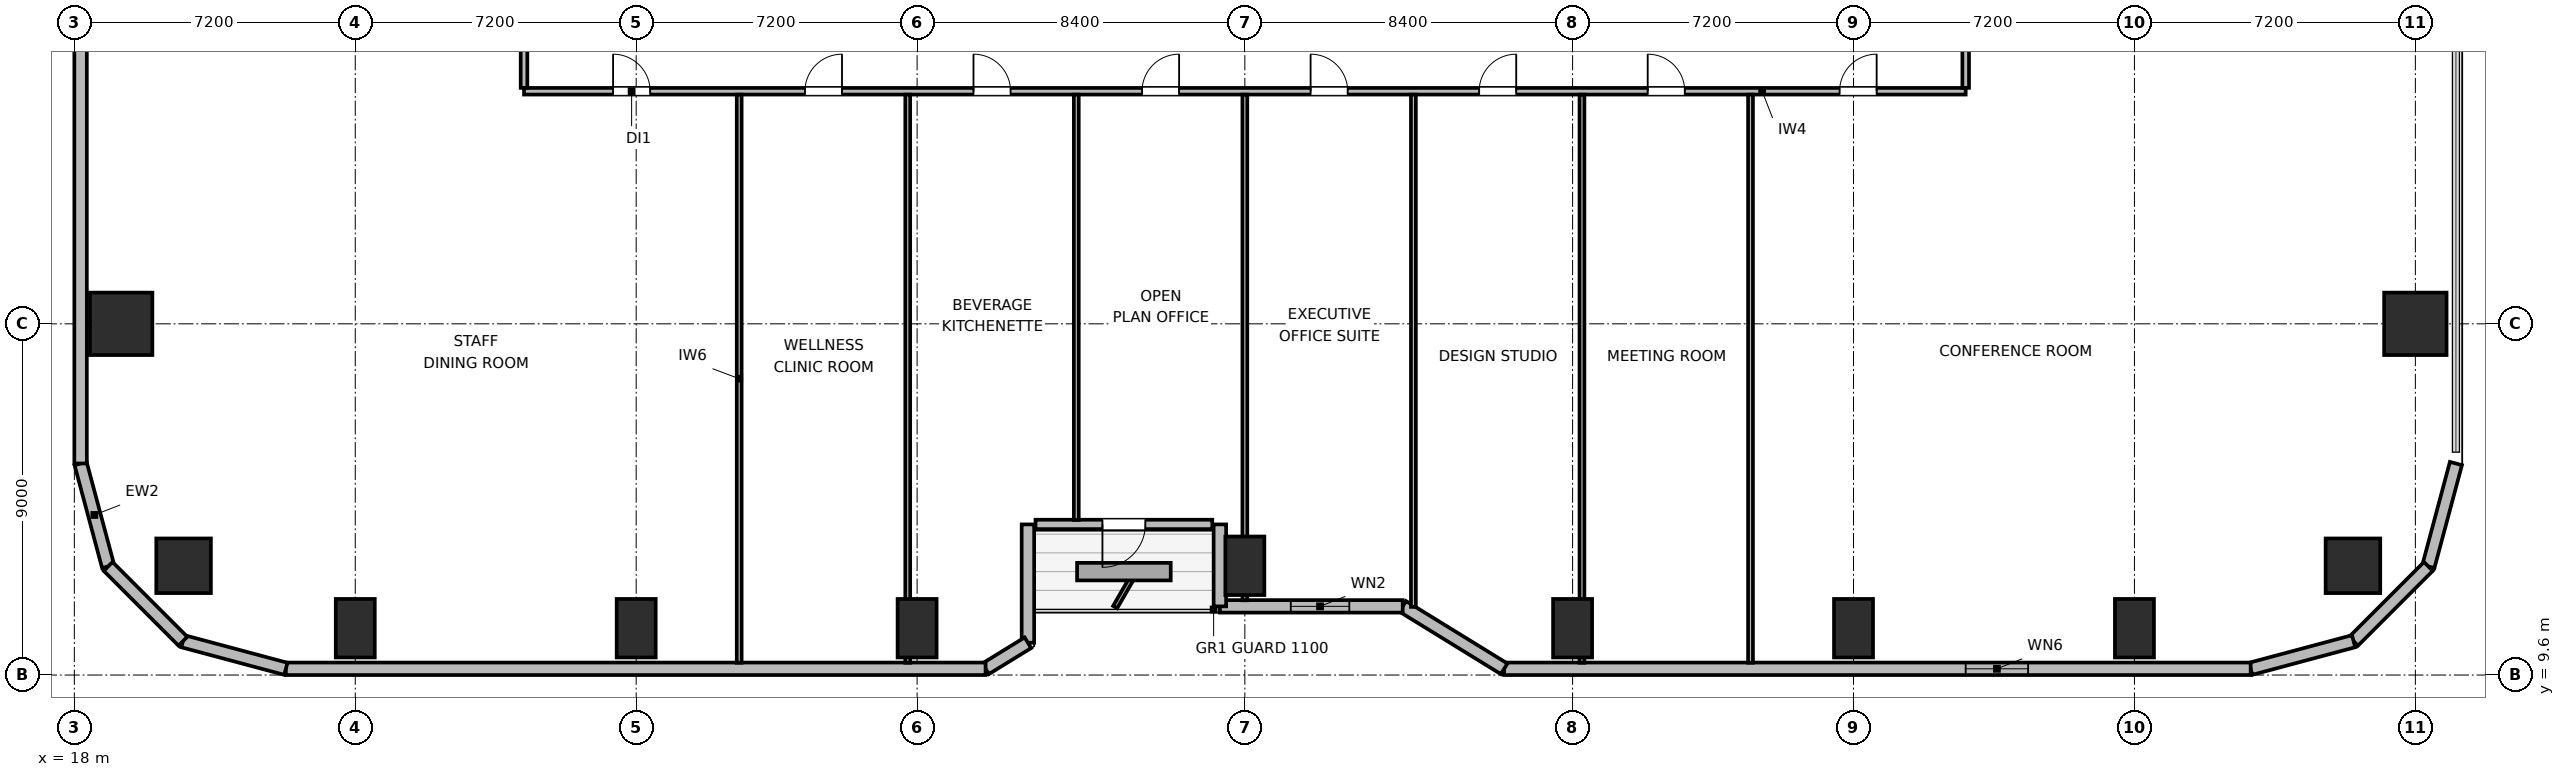
"""IFC4 building model, lengths in metres.
Left out: names, types, materials, properties, quantities, classifications, styles, units other than length and angle.
Written with IfcOpenShell. Run it as: python <this file> out.ifc"""

import sys

from ifc_helpers import new_model, si_unit, direction, frame, frame_2d, origin, origin_2d, place, context, subcontext, project, spatial, rectangle, circle, extrude, element, fill, save


model = new_model("IFC4")
c1 = context("Model", 3, precision=1e-05, world=origin(), true_north=direction((0.0, 1.0)))
c2 = subcontext(c1, "Body", "Model", "MODEL_VIEW")
j1 = project(units=[si_unit("LENGTHUNIT", "METRE"), si_unit("PLANEANGLEUNIT", "RADIAN")], contexts=[c1])
p1 = place(None, origin())
s1 = spatial("IfcSite", under=j1, at=p1, CompositionType="ELEMENT")
p2 = place(p1, origin())
s2 = spatial("IfcBuilding", under=s1, at=p2, CompositionType="ELEMENT")
p3 = place(p2, frame((0.0, 0.0, 56.7)))
s3 = spatial("IfcBuildingStorey", under=s2, at=p3, CompositionType="ELEMENT", Elevation=56.7)
for number, where, z_axis, x_axis in (
    (1, (20.8, 12.4, 0.0), (0.0, 0.0, 1.0), (1.0, 0.0, 0.0)),
    (2, (76.4, 12.4, 0.0), (0.0, 0.0, 1.0), (1.0, 0.0, 0.0)),
):
    element("IfcColumn", number, at=place(p3, frame(where, z_axis=z_axis, x_axis=x_axis)), inside=s3, PredefinedType="COLUMN", context=c2, shape_type="SweptSolid", body=[
        extrude(circle(Radius=0.7, at=origin_2d()), origin(), (0.0, 0.0, 1.0), 3.9),
    ])
for number, where, z_axis, x_axis in (
    (3, (25.2, 10.8, 0.0), (0.0, 0.0, 1.0), (1.0, 0.0, 0.0)),
    (4, (32.4, 10.8, 0.0), (0.0, 0.0, 1.0), (1.0, 0.0, 0.0)),
    (5, (39.6, 10.8, 0.0), (0.0, 0.0, 1.0), (1.0, 0.0, 0.0)),
    (6, (48.0, 12.4, 0.0), (0.0, 0.0, 1.0), (1.0, 0.0, 0.0)),
    (7, (56.4, 10.8, 0.0), (0.0, 0.0, 1.0), (1.0, 0.0, 0.0)),
    (8, (63.6, 10.8, 0.0), (0.0, 0.0, 1.0), (1.0, 0.0, 0.0)),
    (9, (70.8, 10.8, 0.0), (0.0, 0.0, 1.0), (1.0, 0.0, 0.0)),
):
    element("IfcColumn", number, at=place(p3, frame(where, z_axis=z_axis, x_axis=x_axis)), inside=s3, PredefinedType="COLUMN", context=c2, shape_type="SweptSolid", body=[
        extrude(rectangle(XDim=1.0, YDim=1.5, at=origin_2d()), origin(), (0.0, 0.0, 1.0), 3.9),
    ])
for number, where, z_axis, x_axis in (
    (10, (19.2, 18.6, 0.0), (0.0, 0.0, 1.0), (1.0, 0.0, 0.0)),
    (11, (78.0, 18.6, 0.0), (0.0, 0.0, 1.0), (1.0, 0.0, 0.0)),
):
    element("IfcColumn", number, at=place(p3, frame(where, z_axis=z_axis, x_axis=x_axis)), inside=s3, PredefinedType="COLUMN", context=c2, shape_type="SweptSolid", body=[
        extrude(rectangle(XDim=1.6, YDim=1.6, at=origin_2d()), origin(), (0.0, 0.0, 1.0), 3.9),
    ])
p4 = place(p3, frame((18.866, 12.383, 0.0), z_axis=(0.0, 0.0, 1.0), x_axis=(-0.25869736047, 0.965958423373, 0.0)))
e12 = element("IfcWall", 12, at=p4, inside=s3, PredefinedType="SOLIDWALL", context=c2, shape_type="SweptSolid", body=[
    extrude(rectangle(XDim=2.731, YDim=0.32, at=frame_2d((1.366, 0.0))), origin(), (0.0, 0.0, 1.0), 3.64),
])
p5 = place(p3, frame((18.16, 15.021, 0.0), z_axis=(0.0, 0.0, 1.0), x_axis=(0.0, 1.0, 0.0)))
e13 = element("IfcWall", 13, at=p5, inside=s3, PredefinedType="SOLIDWALL", context=c2, shape_type="SweptSolid", body=[
    extrude(rectangle(XDim=14.219, YDim=0.32, at=frame_2d((7.109, 0.0))), origin(), (0.0, 0.0, 1.0), 3.64),
])
p6 = place(p3, frame((79.04, 15.021, 0.0), z_axis=(0.0, 0.0, 1.0), x_axis=(-0.25869736047, -0.965958423373, 0.0)))
e14 = element("IfcWall", 14, at=p6, inside=s3, PredefinedType="SOLIDWALL", context=c2, shape_type="SweptSolid", body=[
    extrude(rectangle(XDim=2.731, YDim=0.32, at=frame_2d((1.366, 0.0))), origin(), (0.0, 0.0, 1.0), 3.64),
])
p7 = place(p3, frame((78.333, 12.383, 0.0), z_axis=(0.0, 0.0, 1.0), x_axis=(-0.707106781187, -0.707106781187, 0.0)))
e15 = element("IfcWall", 15, at=p7, inside=s3, PredefinedType="SOLIDWALL", context=c2, shape_type="SweptSolid", body=[
    extrude(rectangle(XDim=2.71, YDim=0.32, at=frame_2d((1.355, 0.0))), origin(), (0.0, 0.0, 1.0), 3.64),
])
p8 = place(p3, frame((76.417, 10.467, 0.0), z_axis=(0.0, 0.0, 1.0), x_axis=(-0.965964405026, -0.25867502435, 0.0)))
e16 = element("IfcWall", 16, at=p8, inside=s3, PredefinedType="SOLIDWALL", context=c2, shape_type="SweptSolid", body=[
    extrude(rectangle(XDim=2.731, YDim=0.32, at=frame_2d((1.366, 0.0))), origin(), (0.0, 0.0, 1.0), 3.64),
])
p9 = place(p3, frame((73.779, 9.76, 0.0), z_axis=(0.0, 0.0, 1.0), x_axis=(-1.0, 0.0, 0.0)))
e17 = element("IfcWall", 17, at=p9, inside=s3, PredefinedType="SOLIDWALL", context=c2, shape_type="SweptSolid", body=[
    extrude(rectangle(XDim=19.134, YDim=0.32, at=frame_2d((9.567, 0.0))), origin(), (0.0, 0.0, 1.0), 3.64),
])
p10 = place(p9, frame((5.704, 0.0, 0.85)))
e18 = element("IfcOpeningElement", 18, at=p10, cuts=e17, PredefinedType="OPENING", context=c2, shape_type="SweptSolid", body=[
    extrude(rectangle(XDim=1.6, YDim=1.0, at=frame_2d((0.8, 0.5))), frame((0.0, 0.17, 0.0), z_axis=(0.0, -1.0, 0.0), x_axis=(1.0, 0.0, 0.0)), (0.0, 0.0, 1.0), 0.34),
])
p11 = place(p3, frame((54.645, 9.76, 0.0), z_axis=(0.0, 0.0, 1.0), x_axis=(-0.851630857047, 0.524142044989, 0.0)))
e19 = element("IfcWall", 19, at=p11, inside=s3, PredefinedType="SOLIDWALL", context=c2, shape_type="SweptSolid", body=[
    extrude(rectangle(XDim=3.053, YDim=0.32, at=frame_2d((1.526, 0.0))), origin(), (0.0, 0.0, 1.0), 2.875),
])
p12 = place(p3, frame((52.045, 11.36, 0.0), z_axis=(0.0, 0.0, 1.0), x_axis=(-1.0, 0.0, 0.0)))
e20 = element("IfcWall", 20, at=p12, inside=s3, PredefinedType="SOLIDWALL", context=c2, shape_type="SweptSolid", body=[
    extrude(rectangle(XDim=4.685, YDim=0.32, at=frame_2d((2.343, 0.0))), origin(), (0.0, 0.0, 1.0), 2.875),
])
p13 = place(p12, frame((1.368, 0.0, 0.85)))
e21 = element("IfcOpeningElement", 21, at=p13, cuts=e20, PredefinedType="OPENING", context=c2, shape_type="SweptSolid", body=[
    extrude(rectangle(XDim=1.5, YDim=1.1, at=frame_2d((0.75, 0.55))), frame((0.0, 0.17, 0.0), z_axis=(0.0, -1.0, 0.0), x_axis=(1.0, 0.0, 0.0)), (0.0, 0.0, 1.0), 0.34),
])
p14 = place(p3, frame((47.36, 11.36, 0.0), z_axis=(0.0, 0.0, 1.0), x_axis=(0.0, 1.0, 0.0)))
e22 = element("IfcWall", 22, at=p14, inside=s3, PredefinedType="SOLIDWALL", context=c2, shape_type="SweptSolid", body=[
    extrude(rectangle(XDim=2.1, YDim=0.32, at=frame_2d((1.05, 0.0))), origin(), (0.0, 0.0, 1.0), 2.875),
])
p15 = place(p3, frame((47.165, 13.46, 0.0), z_axis=(0.0, 0.0, 1.0), x_axis=(-1.0, 0.0, 0.0)))
e23 = element("IfcWall", 23, at=p15, inside=s3, PredefinedType="SOLIDWALL", context=c2, shape_type="SweptSolid", body=[
    extrude(rectangle(XDim=4.53, YDim=0.24, at=frame_2d((2.265, 0.0))), origin(), (0.0, 0.0, 1.0), 3.64),
])
p16 = place(p15, frame((1.715, 0.0, 0.0)))
e24 = element("IfcOpeningElement", 24, at=p16, cuts=e23, PredefinedType="OPENING", context=c2, shape_type="SweptSolid", body=[
    extrude(rectangle(XDim=1.1, YDim=2.04, at=frame_2d((0.55, 1.02))), frame((0.0, 0.13, 0.0), z_axis=(0.0, -1.0, 0.0), x_axis=(1.0, 0.0, 0.0)), (0.0, 0.0, 1.0), 0.26),
])
p17 = place(p3, frame((42.44, 13.46, 0.0), z_axis=(0.0, 0.0, 1.0), x_axis=(0.0, -1.0, 0.0)))
e25 = element("IfcWall", 25, at=p17, inside=s3, PredefinedType="SOLIDWALL", context=c2, shape_type="SweptSolid", body=[
    extrude(rectangle(XDim=3.032, YDim=0.32, at=frame_2d((1.516, 0.0))), origin(), (0.0, 0.0, 1.0), 2.875),
])
p18 = place(p3, frame((42.44, 10.427, 0.0), z_axis=(0.0, 0.0, 1.0), x_axis=(-0.851776724646, -0.523904964045, 0.0)))
e26 = element("IfcWall", 26, at=p18, inside=s3, PredefinedType="SOLIDWALL", context=c2, shape_type="SweptSolid", body=[
    extrude(rectangle(XDim=1.274, YDim=0.32, at=frame_2d((0.637, 0.0))), origin(), (0.0, 0.0, 1.0), 3.64),
])
p19 = place(p3, frame((41.355, 9.76, 0.0), z_axis=(0.0, 0.0, 1.0), x_axis=(-1.0, 0.0, 0.0)))
e27 = element("IfcWall", 27, at=p19, inside=s3, PredefinedType="SOLIDWALL", context=c2, shape_type="SweptSolid", body=[
    extrude(rectangle(XDim=17.934, YDim=0.32, at=frame_2d((8.967, 0.0))), origin(), (0.0, 0.0, 1.0), 3.64),
])
p20 = place(p3, frame((23.421, 9.76, 0.0), z_axis=(0.0, 0.0, 1.0), x_axis=(-0.965964405026, 0.25867502435, 0.0)))
e28 = element("IfcWall", 28, at=p20, inside=s3, PredefinedType="SOLIDWALL", context=c2, shape_type="SweptSolid", body=[
    extrude(rectangle(XDim=2.731, YDim=0.32, at=frame_2d((1.366, 0.0))), origin(), (0.0, 0.0, 1.0), 3.64),
])
p21 = place(p3, frame((20.783, 10.467, 0.0), z_axis=(0.0, 0.0, 1.0), x_axis=(-0.707106781187, 0.707106781187, 0.0)))
e29 = element("IfcWall", 29, at=p21, inside=s3, PredefinedType="SOLIDWALL", context=c2, shape_type="SweptSolid", body=[
    extrude(rectangle(XDim=2.71, YDim=0.32, at=frame_2d((1.355, 0.0))), origin(), (0.0, 0.0, 1.0), 3.64),
])
p22 = place(p3, frame((29.525, 24.56, 0.0), z_axis=(0.0, 0.0, 1.0), x_axis=(1.0, 0.0, 0.0)))
e30 = element("IfcWall", 30, at=p22, inside=s3, PredefinedType="PARTITIONING", context=c2, shape_type="SweptSolid", body=[
    extrude(rectangle(XDim=36.95, YDim=0.17, at=frame_2d((18.475, 0.0))), origin(), (0.0, 0.0, 1.0), 3.64),
])
p23 = place(p22, frame((2.283, 0.0, 0.0)))
e31 = element("IfcOpeningElement", 31, at=p23, cuts=e30, PredefinedType="OPENING", context=c2, shape_type="SweptSolid", body=[
    extrude(rectangle(XDim=0.95, YDim=2.04, at=frame_2d((0.475, 1.02))), frame((0.0, 0.095, 0.0), z_axis=(0.0, -1.0, 0.0), x_axis=(1.0, 0.0, 0.0)), (0.0, 0.0, 1.0), 0.19),
])
p24 = place(p22, frame((7.2, 0.0, 0.0)))
e32 = element("IfcOpeningElement", 32, at=p24, cuts=e30, PredefinedType="OPENING", context=c2, shape_type="SweptSolid", body=[
    extrude(rectangle(XDim=0.95, YDim=2.04, at=frame_2d((0.475, 1.02))), frame((0.0, 0.095, 0.0), z_axis=(0.0, -1.0, 0.0), x_axis=(1.0, 0.0, 0.0)), (0.0, 0.0, 1.0), 0.19),
])
p25 = place(p22, frame((11.52, 0.0, 0.0)))
e33 = element("IfcOpeningElement", 33, at=p25, cuts=e30, PredefinedType="OPENING", context=c2, shape_type="SweptSolid", body=[
    extrude(rectangle(XDim=0.95, YDim=2.04, at=frame_2d((0.475, 1.02))), frame((0.0, 0.095, 0.0), z_axis=(0.0, -1.0, 0.0), x_axis=(1.0, 0.0, 0.0)), (0.0, 0.0, 1.0), 0.19),
])
p26 = place(p22, frame((15.84, 0.0, 0.0)))
e34 = element("IfcOpeningElement", 34, at=p26, cuts=e30, PredefinedType="OPENING", context=c2, shape_type="SweptSolid", body=[
    extrude(rectangle(XDim=0.95, YDim=2.04, at=frame_2d((0.475, 1.02))), frame((0.0, 0.095, 0.0), z_axis=(0.0, -1.0, 0.0), x_axis=(1.0, 0.0, 0.0)), (0.0, 0.0, 1.0), 0.19),
])
p27 = place(p22, frame((20.16, 0.0, 0.0)))
e35 = element("IfcOpeningElement", 35, at=p27, cuts=e30, PredefinedType="OPENING", context=c2, shape_type="SweptSolid", body=[
    extrude(rectangle(XDim=0.95, YDim=2.04, at=frame_2d((0.475, 1.02))), frame((0.0, 0.095, 0.0), z_axis=(0.0, -1.0, 0.0), x_axis=(1.0, 0.0, 0.0)), (0.0, 0.0, 1.0), 0.19),
])
p28 = place(p22, frame((24.48, 0.0, 0.0)))
e36 = element("IfcOpeningElement", 36, at=p28, cuts=e30, PredefinedType="OPENING", context=c2, shape_type="SweptSolid", body=[
    extrude(rectangle(XDim=0.95, YDim=2.04, at=frame_2d((0.475, 1.02))), frame((0.0, 0.095, 0.0), z_axis=(0.0, -1.0, 0.0), x_axis=(1.0, 0.0, 0.0)), (0.0, 0.0, 1.0), 0.19),
])
p29 = place(p22, frame((28.8, 0.0, 0.0)))
e37 = element("IfcOpeningElement", 37, at=p29, cuts=e30, PredefinedType="OPENING", context=c2, shape_type="SweptSolid", body=[
    extrude(rectangle(XDim=0.95, YDim=2.04, at=frame_2d((0.475, 1.02))), frame((0.0, 0.095, 0.0), z_axis=(0.0, -1.0, 0.0), x_axis=(1.0, 0.0, 0.0)), (0.0, 0.0, 1.0), 0.19),
])
p30 = place(p22, frame((33.718, 0.0, 0.0)))
e38 = element("IfcOpeningElement", 38, at=p30, cuts=e30, PredefinedType="OPENING", context=c2, shape_type="SweptSolid", body=[
    extrude(rectangle(XDim=0.95, YDim=2.04, at=frame_2d((0.475, 1.02))), frame((0.0, 0.095, 0.0), z_axis=(0.0, -1.0, 0.0), x_axis=(1.0, 0.0, 0.0)), (0.0, 0.0, 1.0), 0.19),
])
p31 = place(p3, frame((29.525, 24.647, 0.0), z_axis=(0.0, 0.0, 1.0), x_axis=(0.0, 1.0, 0.0)))
e39 = element("IfcWall", 39, at=p31, inside=s3, PredefinedType="PARTITIONING", context=c2, shape_type="SweptSolid", body=[
    extrude(rectangle(XDim=22.706, YDim=0.17, at=frame_2d((11.353, 0.0))), origin(), (0.0, 0.0, 1.0), 3.64),
])
p32 = place(p31, frame((4.758, 0.0, 0.0)))
e40 = element("IfcOpeningElement", 40, at=p32, cuts=e39, PredefinedType="OPENING", context=c2, shape_type="SweptSolid", body=[
    extrude(rectangle(XDim=0.95, YDim=2.04, at=frame_2d((0.475, 1.02))), frame((0.0, 0.095, 0.0), z_axis=(0.0, -1.0, 0.0), x_axis=(1.0, 0.0, 0.0)), (0.0, 0.0, 1.0), 0.19),
])
p33 = place(p31, frame((16.198, 0.0, 0.0)))
e41 = element("IfcOpeningElement", 41, at=p33, cuts=e39, PredefinedType="OPENING", context=c2, shape_type="SweptSolid", body=[
    extrude(rectangle(XDim=0.95, YDim=2.04, at=frame_2d((0.475, 1.02))), frame((0.0, 0.095, 0.0), z_axis=(0.0, -1.0, 0.0), x_axis=(1.0, 0.0, 0.0)), (0.0, 0.0, 1.0), 0.19),
])
p34 = place(p3, frame((66.475, 24.647, 0.0), z_axis=(0.0, 0.0, 1.0), x_axis=(0.0, 1.0, 0.0)))
e42 = element("IfcWall", 42, at=p34, inside=s3, PredefinedType="PARTITIONING", context=c2, shape_type="SweptSolid", body=[
    extrude(rectangle(XDim=22.706, YDim=0.17, at=frame_2d((11.353, 0.0))), origin(), (0.0, 0.0, 1.0), 3.64),
])
p35 = place(p34, frame((5.758, 0.0, 0.0)))
e43 = element("IfcOpeningElement", 43, at=p35, cuts=e42, PredefinedType="OPENING", context=c2, shape_type="SweptSolid", body=[
    extrude(rectangle(XDim=0.95, YDim=2.04, at=frame_2d((0.475, 1.02))), frame((0.0, 0.095, 0.0), z_axis=(0.0, -1.0, 0.0), x_axis=(1.0, 0.0, 0.0)), (0.0, 0.0, 1.0), 0.19),
])
p36 = place(p34, frame((17.198, 0.0, 0.0)))
e44 = element("IfcOpeningElement", 44, at=p36, cuts=e42, PredefinedType="OPENING", context=c2, shape_type="SweptSolid", body=[
    extrude(rectangle(XDim=0.95, YDim=2.04, at=frame_2d((0.475, 1.02))), frame((0.0, 0.095, 0.0), z_axis=(0.0, -1.0, 0.0), x_axis=(1.0, 0.0, 0.0)), (0.0, 0.0, 1.0), 0.19),
])
p37 = place(p3, frame((35.04, 9.915, 0.0), z_axis=(0.0, 0.0, 1.0), x_axis=(0.0, 1.0, 0.0)))
e45 = element("IfcWall", 45, at=p37, inside=s3, PredefinedType="PARTITIONING", context=c2, shape_type="SweptSolid", body=[
    extrude(rectangle(XDim=14.558, YDim=0.125, at=frame_2d((7.279, 0.0))), origin(), (0.0, 0.0, 1.0), 3.64),
])
p38 = place(p3, frame((39.36, 9.915, 0.0), z_axis=(0.0, 0.0, 1.0), x_axis=(0.0, 1.0, 0.0)))
e46 = element("IfcWall", 46, at=p38, inside=s3, PredefinedType="PARTITIONING", context=c2, shape_type="SweptSolid", body=[
    extrude(rectangle(XDim=14.558, YDim=0.125, at=frame_2d((7.279, 0.0))), origin(), (0.0, 0.0, 1.0), 2.93),
])
p39 = place(p3, frame((43.68, 13.575, 0.0), z_axis=(0.0, 0.0, 1.0), x_axis=(0.0, 1.0, 0.0)))
e47 = element("IfcWall", 47, at=p39, inside=s3, PredefinedType="PARTITIONING", context=c2, shape_type="SweptSolid", body=[
    extrude(rectangle(XDim=10.898, YDim=0.125, at=frame_2d((5.449, 0.0))), origin(), (0.0, 0.0, 1.0), 3.003),
])
p40 = place(p3, frame((48.0, 11.515, 0.0), z_axis=(0.0, 0.0, 1.0), x_axis=(0.0, 1.0, 0.0)))
e48 = element("IfcWall", 48, at=p40, inside=s3, PredefinedType="PARTITIONING", context=c2, shape_type="SweptSolid", body=[
    extrude(rectangle(XDim=12.958, YDim=0.125, at=frame_2d((6.479, 0.0))), origin(), (0.0, 0.0, 1.0), 2.93),
])
p41 = place(p3, frame((52.32, 11.346, 0.0), z_axis=(0.0, 0.0, 1.0), x_axis=(0.0, 1.0, 0.0)))
e49 = element("IfcWall", 49, at=p41, inside=s3, PredefinedType="PARTITIONING", context=c2, shape_type="SweptSolid", body=[
    extrude(rectangle(XDim=13.127, YDim=0.125, at=frame_2d((6.563, 0.0))), origin(), (0.0, 0.0, 1.0), 3.003),
])
p42 = place(p3, frame((56.64, 9.915, 0.0), z_axis=(0.0, 0.0, 1.0), x_axis=(0.0, 1.0, 0.0)))
e50 = element("IfcWall", 50, at=p42, inside=s3, PredefinedType="PARTITIONING", context=c2, shape_type="SweptSolid", body=[
    extrude(rectangle(XDim=14.558, YDim=0.125, at=frame_2d((7.279, 0.0))), origin(), (0.0, 0.0, 1.0), 2.93),
])
p43 = place(p3, frame((60.96, 9.915, 0.0), z_axis=(0.0, 0.0, 1.0), x_axis=(0.0, 1.0, 0.0)))
e51 = element("IfcWall", 51, at=p43, inside=s3, PredefinedType="PARTITIONING", context=c2, shape_type="SweptSolid", body=[
    extrude(rectangle(XDim=14.558, YDim=0.125, at=frame_2d((7.279, 0.0))), origin(), (0.0, 0.0, 1.0), 3.64),
])
p44 = place(p10, origin())
e52 = element("IfcWindow", 52, at=p44, inside=s3, PartitioningType="SINGLE_PANEL", PredefinedType="WINDOW", context=c2, shape_type="SweptSolid", body=[
    extrude(rectangle(XDim=1.6, YDim=1.0, at=frame_2d((0.8, 0.5))), frame((0.0, 0.03, 0.0), z_axis=(0.0, -1.0, 0.0), x_axis=(1.0, 0.0, 0.0)), (0.0, 0.0, 1.0), 0.06),
])
fill(e18, e52)
p45 = place(p13, origin())
e53 = element("IfcWindow", 53, at=p45, inside=s3, PartitioningType="SINGLE_PANEL", PredefinedType="WINDOW", context=c2, shape_type="SweptSolid", body=[
    extrude(rectangle(XDim=1.5, YDim=1.1, at=frame_2d((0.75, 0.55))), frame((0.0, 0.03, 0.0), z_axis=(0.0, -1.0, 0.0), x_axis=(1.0, 0.0, 0.0)), (0.0, 0.0, 1.0), 0.06),
])
fill(e21, e53)
p46 = place(p16, origin())
e54 = element("IfcDoor", 54, at=p46, inside=s3, OperationType="SINGLE_SWING_RIGHT", PredefinedType="DOOR", context=c2, shape_type="SweptSolid", body=[
    extrude(rectangle(XDim=1.1, YDim=2.04, at=frame_2d((0.55, 1.02))), frame((0.0, 0.025, 0.0), z_axis=(0.0, -1.0, 0.0), x_axis=(1.0, 0.0, 0.0)), (0.0, 0.0, 1.0), 0.05),
])
fill(e24, e54)
p47 = place(p23, origin())
e55 = element("IfcDoor", 55, at=p47, inside=s3, OperationType="SINGLE_SWING_LEFT", PredefinedType="DOOR", context=c2, shape_type="SweptSolid", body=[
    extrude(rectangle(XDim=0.95, YDim=2.04, at=frame_2d((0.475, 1.02))), frame((0.0, 0.025, 0.0), z_axis=(0.0, -1.0, 0.0), x_axis=(1.0, 0.0, 0.0)), (0.0, 0.0, 1.0), 0.05),
])
fill(e31, e55)
p48 = place(p24, origin())
e56 = element("IfcDoor", 56, at=p48, inside=s3, OperationType="SINGLE_SWING_RIGHT", PredefinedType="DOOR", context=c2, shape_type="SweptSolid", body=[
    extrude(rectangle(XDim=0.95, YDim=2.04, at=frame_2d((0.475, 1.02))), frame((0.0, 0.025, 0.0), z_axis=(0.0, -1.0, 0.0), x_axis=(1.0, 0.0, 0.0)), (0.0, 0.0, 1.0), 0.05),
])
fill(e32, e56)
p49 = place(p25, origin())
e57 = element("IfcDoor", 57, at=p49, inside=s3, OperationType="SINGLE_SWING_LEFT", PredefinedType="DOOR", context=c2, shape_type="SweptSolid", body=[
    extrude(rectangle(XDim=0.95, YDim=2.04, at=frame_2d((0.475, 1.02))), frame((0.0, 0.025, 0.0), z_axis=(0.0, -1.0, 0.0), x_axis=(1.0, 0.0, 0.0)), (0.0, 0.0, 1.0), 0.05),
])
fill(e33, e57)
p50 = place(p26, origin())
e58 = element("IfcDoor", 58, at=p50, inside=s3, OperationType="SINGLE_SWING_RIGHT", PredefinedType="DOOR", context=c2, shape_type="SweptSolid", body=[
    extrude(rectangle(XDim=0.95, YDim=2.04, at=frame_2d((0.475, 1.02))), frame((0.0, 0.025, 0.0), z_axis=(0.0, -1.0, 0.0), x_axis=(1.0, 0.0, 0.0)), (0.0, 0.0, 1.0), 0.05),
])
fill(e34, e58)
p51 = place(p27, origin())
e59 = element("IfcDoor", 59, at=p51, inside=s3, OperationType="SINGLE_SWING_LEFT", PredefinedType="DOOR", context=c2, shape_type="SweptSolid", body=[
    extrude(rectangle(XDim=0.95, YDim=2.04, at=frame_2d((0.475, 1.02))), frame((0.0, 0.025, 0.0), z_axis=(0.0, -1.0, 0.0), x_axis=(1.0, 0.0, 0.0)), (0.0, 0.0, 1.0), 0.05),
])
fill(e35, e59)
p52 = place(p28, origin())
e60 = element("IfcDoor", 60, at=p52, inside=s3, OperationType="SINGLE_SWING_RIGHT", PredefinedType="DOOR", context=c2, shape_type="SweptSolid", body=[
    extrude(rectangle(XDim=0.95, YDim=2.04, at=frame_2d((0.475, 1.02))), frame((0.0, 0.025, 0.0), z_axis=(0.0, -1.0, 0.0), x_axis=(1.0, 0.0, 0.0)), (0.0, 0.0, 1.0), 0.05),
])
fill(e36, e60)
p53 = place(p29, origin())
e61 = element("IfcDoor", 61, at=p53, inside=s3, OperationType="SINGLE_SWING_LEFT", PredefinedType="DOOR", context=c2, shape_type="SweptSolid", body=[
    extrude(rectangle(XDim=0.95, YDim=2.04, at=frame_2d((0.475, 1.02))), frame((0.0, 0.025, 0.0), z_axis=(0.0, -1.0, 0.0), x_axis=(1.0, 0.0, 0.0)), (0.0, 0.0, 1.0), 0.05),
])
fill(e37, e61)
p54 = place(p30, origin())
e62 = element("IfcDoor", 62, at=p54, inside=s3, OperationType="SINGLE_SWING_RIGHT", PredefinedType="DOOR", context=c2, shape_type="SweptSolid", body=[
    extrude(rectangle(XDim=0.95, YDim=2.04, at=frame_2d((0.475, 1.02))), frame((0.0, 0.025, 0.0), z_axis=(0.0, -1.0, 0.0), x_axis=(1.0, 0.0, 0.0)), (0.0, 0.0, 1.0), 0.05),
])
fill(e38, e62)
save(model, sys.argv[1])
